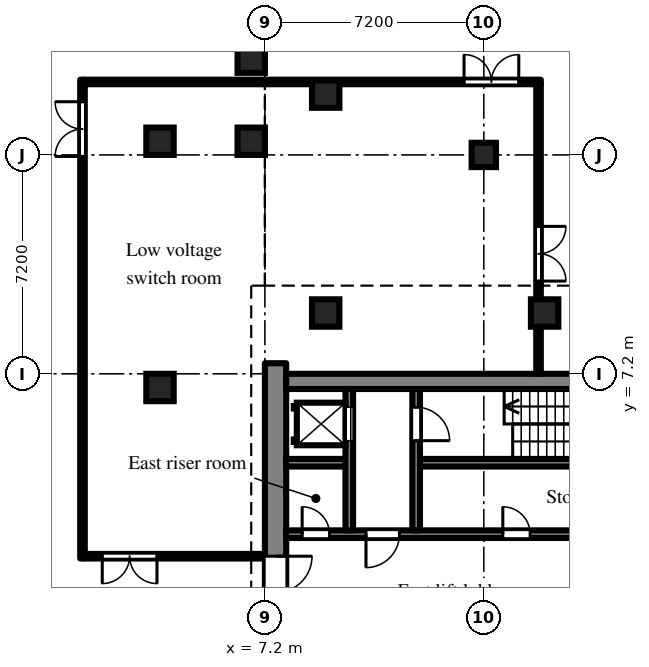
"""IFC4 building model, lengths in metres.
Left out: names, types, materials, properties, quantities, classifications, styles, units other than length and angle.
Written with IfcOpenShell. Run it as: python <this file> out.ifc"""

import sys

from ifc_helpers import new_model, si_unit, direction, frame, frame_2d, origin, origin_2d, place, context, subcontext, project, spatial, rectangle, extrude, element, fill, save


model = new_model("IFC4")
c1 = context("Model", 3, precision=1e-05, world=origin(), true_north=direction((0.0, 1.0)))
c2 = subcontext(c1, "Body", "Model", "MODEL_VIEW")
j1 = project(units=[si_unit("LENGTHUNIT", "METRE"), si_unit("PLANEANGLEUNIT", "RADIAN")], contexts=[c1])
p1 = place(None, origin())
s1 = spatial("IfcSite", under=j1, at=p1, CompositionType="ELEMENT")
p2 = place(p1, origin())
s2 = spatial("IfcBuilding", under=s1, at=p2, CompositionType="ELEMENT")
p3 = place(p2, frame((0.0, 0.0, -4.8)))
s3 = spatial("IfcBuildingStorey", under=s2, at=p3, CompositionType="ELEMENT", Elevation=-4.8)
for number, where, z_axis, x_axis in (
    (1, (3.75, 6.75, -0.5), (0.0, 0.0, 1.0), (1.0, 0.0, 0.0)),
    (2, (3.75, 14.85, -0.5), (0.0, 0.0, 1.0), (1.0, 0.0, 0.0)),
    (3, (6.75, 14.85, -0.5), (0.0, 0.0, 1.0), (1.0, 0.0, 0.0)),
    (4, (6.75, 17.55, -0.5), (0.0, 0.0, 1.0), (1.0, 0.0, 0.0)),
):
    element("IfcColumn", number, at=place(p3, frame(where, z_axis=z_axis, x_axis=x_axis)), inside=s3, PredefinedType="COLUMN", context=c2, shape_type="SweptSolid", body=[
        extrude(rectangle(XDim=0.9, YDim=0.9, at=origin_2d()), origin(), (0.0, 0.0, 1.0), 5.3),
    ])
p4 = place(p3, frame((14.4, 14.4, -0.5), z_axis=(0.0, 0.0, 1.0), x_axis=(1.0, 0.0, 0.0)))
e5 = element("IfcColumn", 5, at=p4, inside=s3, PredefinedType="COLUMN", context=c2, shape_type="SweptSolid", body=[
    extrude(rectangle(XDim=0.8, YDim=0.8, at=origin_2d()), origin(), (0.0, 0.0, 1.0), 5.3),
])
for number, where, z_axis, x_axis in (
    (6, (9.2, 9.2, -0.5), (0.0, 0.0, 1.0), (1.0, 0.0, 0.0)),
    (7, (9.2, 16.4, -0.5), (0.0, 0.0, 1.0), (1.0, 0.0, 0.0)),
    (8, (16.4, 9.2, -0.5), (0.0, 0.0, 1.0), (1.0, 0.0, 0.0)),
):
    element("IfcColumn", number, at=place(p3, frame(where, z_axis=z_axis, x_axis=x_axis)), inside=s3, PredefinedType="COLUMN", context=c2, shape_type="SweptSolid", body=[
        extrude(rectangle(XDim=0.9, YDim=0.9, at=origin_2d()), origin(), (0.0, 0.0, 1.0), 5.3),
    ])
p5 = place(p3, frame((7.55, -7.548, 0.0), z_axis=(0.0, 0.0, 1.0), x_axis=(0.0, 1.0, 0.0)))
e9 = element("IfcWall", 9, at=p5, inside=s3, PredefinedType="SHEAR", context=c2, shape_type="SweptSolid", body=[
    extrude(rectangle(XDim=15.096, YDim=0.7, at=frame_2d((7.548, 0.0))), origin(), (0.0, 0.0, 1.0), 4.35),
])
p6 = place(p5, frame((6.348, 0.0, 0.0)))
e10 = element("IfcOpeningElement", 10, at=p6, cuts=e9, PredefinedType="OPENING", context=c2, shape_type="SweptSolid", body=[
    extrude(rectangle(XDim=2.4, YDim=2.2, at=frame_2d((1.2, 1.1))), frame((0.0, 0.36, 0.0), z_axis=(0.0, -1.0, 0.0), x_axis=(1.0, 0.0, 0.0)), (0.0, 0.0, 1.0), 0.72),
])
p7 = place(p3, frame((7.9, 6.95, 0.0), z_axis=(0.0, 0.0, 1.0), x_axis=(1.0, 0.0, 0.0)))
e11 = element("IfcWall", 11, at=p7, inside=s3, PredefinedType="SHEAR", context=c2, shape_type="SweptSolid", body=[
    extrude(rectangle(XDim=12.95, YDim=0.5, at=frame_2d((6.475, 0.0))), origin(), (0.0, 0.0, 1.0), 4.35),
])
p8 = place(p3, frame((7.9, 1.925, 0.0), z_axis=(0.0, 0.0, 1.0), x_axis=(1.0, 0.0, 0.0)))
e12 = element("IfcWall", 12, at=p8, inside=s3, PredefinedType="SHEAR", context=c2, shape_type="SweptSolid", body=[
    extrude(rectangle(XDim=12.95, YDim=0.25, at=frame_2d((6.475, 0.0))), origin(), (0.0, 0.0, 1.0), 4.35),
])
p9 = place(p8, frame((0.525, 0.0, 0.0)))
e13 = element("IfcOpeningElement", 13, at=p9, cuts=e12, PredefinedType="OPENING", context=c2, shape_type="SweptSolid", body=[
    extrude(rectangle(XDim=0.9, YDim=2.1, at=frame_2d((0.45, 1.05))), frame((0.0, 0.135, 0.0), z_axis=(0.0, -1.0, 0.0), x_axis=(1.0, 0.0, 0.0)), (0.0, 0.0, 1.0), 0.27),
])
p10 = place(p8, frame((2.625, 0.0, 0.0)))
e14 = element("IfcOpeningElement", 14, at=p10, cuts=e12, PredefinedType="OPENING", context=c2, shape_type="SweptSolid", body=[
    extrude(rectangle(XDim=1.1, YDim=2.1, at=frame_2d((0.55, 1.05))), frame((0.0, 0.135, 0.0), z_axis=(0.0, -1.0, 0.0), x_axis=(1.0, 0.0, 0.0)), (0.0, 0.0, 1.0), 0.27),
])
p11 = place(p8, frame((7.125, 0.0, 0.0)))
e15 = element("IfcOpeningElement", 15, at=p11, cuts=e12, PredefinedType="OPENING", context=c2, shape_type="SweptSolid", body=[
    extrude(rectangle(XDim=0.9, YDim=2.1, at=frame_2d((0.45, 1.05))), frame((0.0, 0.135, 0.0), z_axis=(0.0, -1.0, 0.0), x_axis=(1.0, 0.0, 0.0)), (0.0, 0.0, 1.0), 0.27),
])
p12 = place(p3, frame((7.9, 4.275, 0.0), z_axis=(0.0, 0.0, 1.0), x_axis=(1.0, 0.0, 0.0)))
e16 = element("IfcWall", 16, at=p12, inside=s3, PredefinedType="SHEAR", context=c2, shape_type="SweptSolid", body=[
    extrude(rectangle(XDim=1.95, YDim=0.25, at=frame_2d((0.975, 0.0))), origin(), (0.0, 0.0, 1.0), 4.35),
])
p13 = place(p3, frame((12.3, 4.275, 0.0), z_axis=(0.0, 0.0, 1.0), x_axis=(1.0, 0.0, 0.0)))
e17 = element("IfcWall", 17, at=p13, inside=s3, PredefinedType="SHEAR", context=c2, shape_type="SweptSolid", body=[
    extrude(rectangle(XDim=8.55, YDim=0.25, at=frame_2d((4.275, 0.0))), origin(), (0.0, 0.0, 1.0), 4.35),
])
p14 = place(p3, frame((9.975, 2.05, 0.0), z_axis=(0.0, 0.0, 1.0), x_axis=(0.0, 1.0, 0.0)))
e18 = element("IfcWall", 18, at=p14, inside=s3, PredefinedType="SHEAR", context=c2, shape_type="SweptSolid", body=[
    extrude(rectangle(XDim=4.65, YDim=0.25, at=frame_2d((2.325, 0.0))), origin(), (0.0, 0.0, 1.0), 4.35),
])
p15 = place(p14, frame((2.95, 0.0, 0.0)))
e19 = element("IfcOpeningElement", 19, at=p15, cuts=e18, PredefinedType="OPENING", context=c2, shape_type="SweptSolid", body=[
    extrude(rectangle(XDim=1.1, YDim=2.1, at=frame_2d((0.55, 1.05))), frame((0.0, 0.135, 0.0), z_axis=(0.0, -1.0, 0.0), x_axis=(1.0, 0.0, 0.0)), (0.0, 0.0, 1.0), 0.27),
])
p16 = place(p3, frame((12.175, 2.05, 0.0), z_axis=(0.0, 0.0, 1.0), x_axis=(0.0, 1.0, 0.0)))
e20 = element("IfcWall", 20, at=p16, inside=s3, PredefinedType="SHEAR", context=c2, shape_type="SweptSolid", body=[
    extrude(rectangle(XDim=4.65, YDim=0.25, at=frame_2d((2.325, 0.0))), origin(), (0.0, 0.0, 1.0), 4.35),
])
p17 = place(p16, frame((2.95, 0.0, 0.0)))
e21 = element("IfcOpeningElement", 21, at=p17, cuts=e20, PredefinedType="OPENING", context=c2, shape_type="SweptSolid", body=[
    extrude(rectangle(XDim=1.1, YDim=2.1, at=frame_2d((0.55, 1.05))), frame((0.0, 0.135, 0.0), z_axis=(0.0, -1.0, 0.0), x_axis=(1.0, 0.0, 0.0)), (0.0, 0.0, 1.0), 0.27),
])
p18 = place(p3, frame((1.2, 1.125, 0.0), z_axis=(0.0, 0.0, 1.0), x_axis=(0.0, 1.0, 0.0)))
e22 = element("IfcWall", 22, at=p18, inside=s3, PredefinedType="PARTITIONING", context=c2, shape_type="SweptSolid", body=[
    extrude(rectangle(XDim=15.75, YDim=0.15, at=frame_2d((7.875, 0.0))), origin(), (0.0, 0.0, 1.0), 4.35),
])
p19 = place(p18, frame((13.225, 0.0, 0.0)))
e23 = element("IfcOpeningElement", 23, at=p19, cuts=e22, PredefinedType="OPENING", context=c2, shape_type="SweptSolid", body=[
    extrude(rectangle(XDim=1.8, YDim=2.1, at=frame_2d((0.9, 1.05))), frame((0.0, 0.085, 0.0), z_axis=(0.0, -1.0, 0.0), x_axis=(1.0, 0.0, 0.0)), (0.0, 0.0, 1.0), 0.17),
])
p20 = place(p3, frame((1.275, 1.2, 0.0), z_axis=(0.0, 0.0, 1.0), x_axis=(1.0, 0.0, 0.0)))
e24 = element("IfcWall", 24, at=p20, inside=s3, PredefinedType="PARTITIONING", context=c2, shape_type="SweptSolid", body=[
    extrude(rectangle(XDim=5.925, YDim=0.15, at=frame_2d((2.962, 0.0))), origin(), (0.0, 0.0, 1.0), 4.35),
])
p21 = place(p20, frame((0.575, 0.0, 0.0)))
e25 = element("IfcOpeningElement", 25, at=p21, cuts=e24, PredefinedType="OPENING", context=c2, shape_type="SweptSolid", body=[
    extrude(rectangle(XDim=1.8, YDim=2.1, at=frame_2d((0.9, 1.05))), frame((0.0, 0.085, 0.0), z_axis=(0.0, -1.0, 0.0), x_axis=(1.0, 0.0, 0.0)), (0.0, 0.0, 1.0), 0.17),
])
p22 = place(p3, frame((1.275, 16.8, 0.0), z_axis=(0.0, 0.0, 1.0), x_axis=(1.0, 0.0, 0.0)))
e26 = element("IfcWall", 26, at=p22, inside=s3, PredefinedType="PARTITIONING", context=c2, shape_type="SweptSolid", body=[
    extrude(rectangle(XDim=15.0, YDim=0.15, at=frame_2d((7.5, 0.0))), origin(), (0.0, 0.0, 1.0), 4.35),
])
p23 = place(p22, frame((12.475, 0.0, 0.0)))
e27 = element("IfcOpeningElement", 27, at=p23, cuts=e26, PredefinedType="OPENING", context=c2, shape_type="SweptSolid", body=[
    extrude(rectangle(XDim=1.8, YDim=2.1, at=frame_2d((0.9, 1.05))), frame((0.0, 0.085, 0.0), z_axis=(0.0, -1.0, 0.0), x_axis=(1.0, 0.0, 0.0)), (0.0, 0.0, 1.0), 0.17),
])
p24 = place(p3, frame((16.2, 7.2, 0.0), z_axis=(0.0, 0.0, 1.0), x_axis=(0.0, 1.0, 0.0)))
e28 = element("IfcWall", 28, at=p24, inside=s3, PredefinedType="PARTITIONING", context=c2, shape_type="SweptSolid", body=[
    extrude(rectangle(XDim=9.525, YDim=0.15, at=frame_2d((4.763, 0.0))), origin(), (0.0, 0.0, 1.0), 4.35),
])
p25 = place(p24, frame((3.05, 0.0, 0.0)))
e29 = element("IfcOpeningElement", 29, at=p25, cuts=e28, PredefinedType="OPENING", context=c2, shape_type="SweptSolid", body=[
    extrude(rectangle(XDim=1.8, YDim=2.1, at=frame_2d((0.9, 1.05))), frame((0.0, 0.085, 0.0), z_axis=(0.0, -1.0, 0.0), x_axis=(1.0, 0.0, 0.0)), (0.0, 0.0, 1.0), 0.17),
])
p26 = place(p15, origin())
e30 = element("IfcDoor", 30, at=p26, inside=s3, OperationType="SLIDING_TO_LEFT", PredefinedType="DOOR", context=c2, shape_type="SweptSolid", body=[
    extrude(rectangle(XDim=1.1, YDim=2.1, at=frame_2d((0.55, 1.05))), frame((0.0, 0.025, 0.0), z_axis=(0.0, -1.0, 0.0), x_axis=(1.0, 0.0, 0.0)), (0.0, 0.0, 1.0), 0.05),
])
fill(e19, e30)
p27 = place(p17, frame((1.1, 0.0, 0.0), z_axis=(0.0, 0.0, 1.0), x_axis=(-1.0, 0.0, 0.0)))
e31 = element("IfcDoor", 31, at=p27, inside=s3, OperationType="SINGLE_SWING_RIGHT", PredefinedType="DOOR", context=c2, shape_type="SweptSolid", body=[
    extrude(rectangle(XDim=1.1, YDim=2.1, at=frame_2d((0.55, 1.05))), frame((0.0, 0.025, 0.0), z_axis=(0.0, -1.0, 0.0), x_axis=(1.0, 0.0, 0.0)), (0.0, 0.0, 1.0), 0.05),
])
fill(e21, e31)
p28 = place(p9, origin())
e32 = element("IfcDoor", 32, at=p28, inside=s3, OperationType="SINGLE_SWING_LEFT", PredefinedType="DOOR", context=c2, shape_type="SweptSolid", body=[
    extrude(rectangle(XDim=0.9, YDim=2.1, at=frame_2d((0.45, 1.05))), frame((0.0, 0.025, 0.0), z_axis=(0.0, -1.0, 0.0), x_axis=(1.0, 0.0, 0.0)), (0.0, 0.0, 1.0), 0.05),
])
fill(e13, e32)
p29 = place(p10, frame((1.1, 0.0, 0.0), z_axis=(0.0, 0.0, 1.0), x_axis=(-1.0, 0.0, 0.0)))
e33 = element("IfcDoor", 33, at=p29, inside=s3, OperationType="SINGLE_SWING_RIGHT", PredefinedType="DOOR", context=c2, shape_type="SweptSolid", body=[
    extrude(rectangle(XDim=1.1, YDim=2.1, at=frame_2d((0.55, 1.05))), frame((0.0, 0.025, 0.0), z_axis=(0.0, -1.0, 0.0), x_axis=(1.0, 0.0, 0.0)), (0.0, 0.0, 1.0), 0.05),
])
fill(e14, e33)
p30 = place(p6, frame((2.4, 0.0, 0.0), z_axis=(0.0, 0.0, 1.0), x_axis=(-1.0, 0.0, 0.0)))
e34 = element("IfcDoor", 34, at=p30, inside=s3, OperationType="DOUBLE_DOOR_DOUBLE_SWING", PredefinedType="DOOR", context=c2, shape_type="SweptSolid", body=[
    extrude(rectangle(XDim=2.4, YDim=2.2, at=frame_2d((1.2, 1.1))), frame((0.0, 0.025, 0.0), z_axis=(0.0, -1.0, 0.0), x_axis=(1.0, 0.0, 0.0)), (0.0, 0.0, 1.0), 0.05),
])
fill(e10, e34)
p31 = place(p11, origin())
e35 = element("IfcDoor", 35, at=p31, inside=s3, OperationType="SINGLE_SWING_LEFT", PredefinedType="DOOR", context=c2, shape_type="SweptSolid", body=[
    extrude(rectangle(XDim=0.9, YDim=2.1, at=frame_2d((0.45, 1.05))), frame((0.0, 0.025, 0.0), z_axis=(0.0, -1.0, 0.0), x_axis=(1.0, 0.0, 0.0)), (0.0, 0.0, 1.0), 0.05),
])
fill(e15, e35)
p32 = place(p19, origin())
e36 = element("IfcDoor", 36, at=p32, inside=s3, OperationType="DOUBLE_DOOR_DOUBLE_SWING", PredefinedType="DOOR", context=c2, shape_type="SweptSolid", body=[
    extrude(rectangle(XDim=1.8, YDim=2.1, at=frame_2d((0.9, 1.05))), frame((0.0, 0.025, 0.0), z_axis=(0.0, -1.0, 0.0), x_axis=(1.0, 0.0, 0.0)), (0.0, 0.0, 1.0), 0.05),
])
fill(e23, e36)
p33 = place(p21, frame((1.8, 0.0, 0.0), z_axis=(0.0, 0.0, 1.0), x_axis=(-1.0, 0.0, 0.0)))
e37 = element("IfcDoor", 37, at=p33, inside=s3, OperationType="DOUBLE_DOOR_DOUBLE_SWING", PredefinedType="DOOR", context=c2, shape_type="SweptSolid", body=[
    extrude(rectangle(XDim=1.8, YDim=2.1, at=frame_2d((0.9, 1.05))), frame((0.0, 0.025, 0.0), z_axis=(0.0, -1.0, 0.0), x_axis=(1.0, 0.0, 0.0)), (0.0, 0.0, 1.0), 0.05),
])
fill(e25, e37)
p34 = place(p23, origin())
e38 = element("IfcDoor", 38, at=p34, inside=s3, OperationType="DOUBLE_DOOR_DOUBLE_SWING", PredefinedType="DOOR", context=c2, shape_type="SweptSolid", body=[
    extrude(rectangle(XDim=1.8, YDim=2.1, at=frame_2d((0.9, 1.05))), frame((0.0, 0.025, 0.0), z_axis=(0.0, -1.0, 0.0), x_axis=(1.0, 0.0, 0.0)), (0.0, 0.0, 1.0), 0.05),
])
fill(e27, e38)
p35 = place(p25, frame((1.8, 0.0, 0.0), z_axis=(0.0, 0.0, 1.0), x_axis=(-1.0, 0.0, 0.0)))
e39 = element("IfcDoor", 39, at=p35, inside=s3, OperationType="DOUBLE_DOOR_DOUBLE_SWING", PredefinedType="DOOR", context=c2, shape_type="SweptSolid", body=[
    extrude(rectangle(XDim=1.8, YDim=2.1, at=frame_2d((0.9, 1.05))), frame((0.0, 0.025, 0.0), z_axis=(0.0, -1.0, 0.0), x_axis=(1.0, 0.0, 0.0)), (0.0, 0.0, 1.0), 0.05),
])
fill(e29, e39)
save(model, sys.argv[1])
